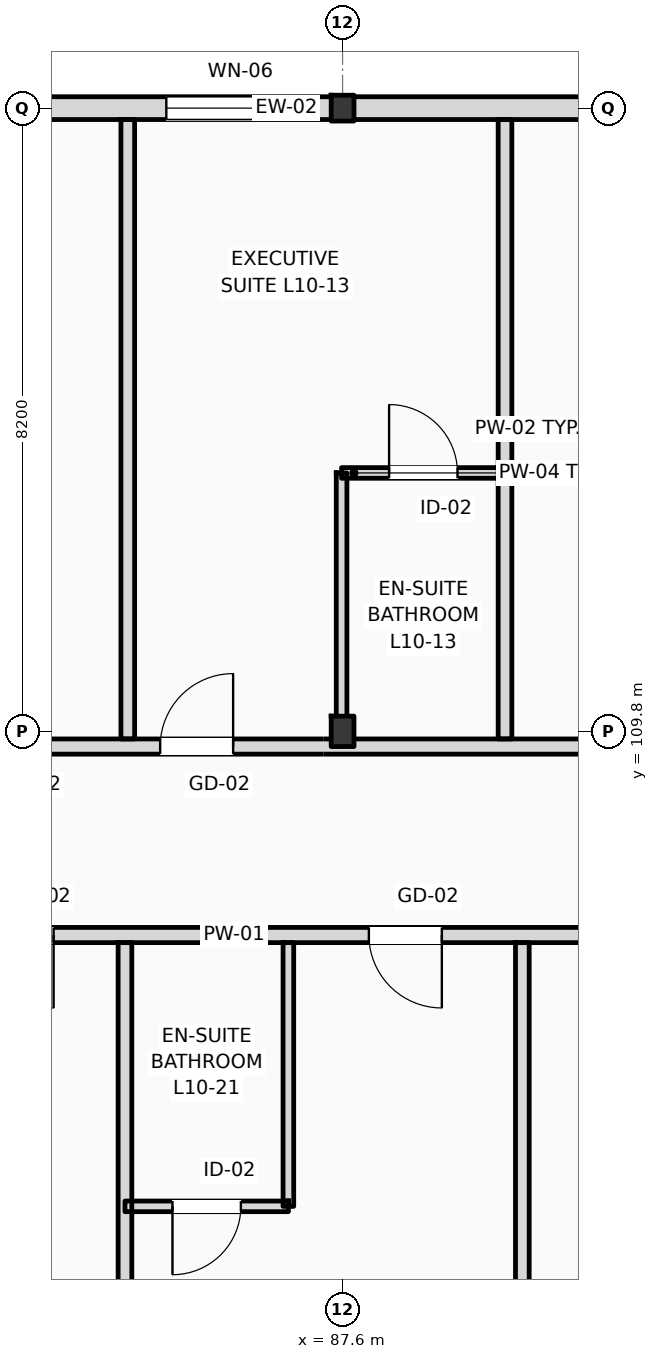
"""IFC4 building model, lengths in metres.
Left out: names, types, materials, properties, quantities, classifications, styles, units other than length and angle.
Written with IfcOpenShell. Run it as: python <this file> out.ifc"""

import sys

from ifc_helpers import new_model, si_unit, direction, frame, frame_2d, origin, origin_2d, place, context, subcontext, project, spatial, rectangle, i_section, extrude, element, fill, save


model = new_model("IFC4")
c1 = context("Model", 3, precision=1e-05, world=origin(), true_north=direction((0.0, 1.0)))
c2 = subcontext(c1, "Body", "Model", "MODEL_VIEW")
j1 = project(units=[si_unit("LENGTHUNIT", "METRE"), si_unit("PLANEANGLEUNIT", "RADIAN")], contexts=[c1])
p1 = place(None, origin())
s1 = spatial("IfcSite", under=j1, at=p1, CompositionType="ELEMENT")
p2 = place(p1, origin())
s2 = spatial("IfcBuilding", under=s1, at=p2, CompositionType="ELEMENT")
p3 = place(p2, frame((0.0, 0.0, 42.6)))
s3 = spatial("IfcBuildingStorey", under=s2, at=p3, CompositionType="ELEMENT", Elevation=42.6)
p4 = place(p3, frame((87.6, 109.8, 0.0), z_axis=(0.0, 0.0, 1.0), x_axis=(1.0, 0.0, 0.0)))
e1 = element("IfcColumn", 1, at=p4, inside=s3, PredefinedType="COLUMN", context=c2, shape_type="SweptSolid", body=[
    extrude(i_section(OverallWidth=0.3, OverallDepth=0.4, WebThickness=0.013, FlangeThickness=0.024, FilletRadius=0.027, at=origin_2d()), origin(), (0.0, 0.0, 1.0), 4.2),
])
p5 = place(p3, frame((87.6, 118.0, 0.0), z_axis=(0.0, 0.0, 1.0), x_axis=(1.0, 0.0, 0.0)))
e2 = element("IfcColumn", 2, at=p5, inside=s3, PredefinedType="COLUMN", context=c2, shape_type="SweptSolid", body=[
    extrude(i_section(OverallWidth=0.3, OverallDepth=0.34, WebThickness=0.012, FlangeThickness=0.021, FilletRadius=0.027, at=origin_2d()), origin(), (0.0, 0.0, 1.0), 4.2),
])
p6 = place(p3, frame((22.5, 118.0, 0.0), z_axis=(0.0, 0.0, 1.0), x_axis=(1.0, 0.0, 0.0)))
e3 = element("IfcWall", 3, at=p6, inside=s3, PredefinedType="STANDARD", context=c2, shape_type="SweptSolid", body=[
    extrude(rectangle(XDim=72.9, YDim=0.3, at=frame_2d((36.45, 0.0))), origin(), (0.0, 0.0, 1.0), 3.42),
])
p7 = place(p6, frame((3.611, 0.0, 0.9)))
e4 = element("IfcOpeningElement", 4, at=p7, cuts=e3, PredefinedType="OPENING", context=c2, shape_type="SweptSolid", body=[
    extrude(rectangle(XDim=1.35, YDim=1.75, at=frame_2d((0.675, 0.875))), frame((0.0, 0.16, 0.0), z_axis=(0.0, -1.0, 0.0), x_axis=(1.0, 0.0, 0.0)), (0.0, 0.0, 1.0), 0.32),
])
p8 = place(p6, frame((7.091, 0.0, 0.0)))
e5 = element("IfcOpeningElement", 5, at=p8, cuts=e3, PredefinedType="OPENING", context=c2, shape_type="SweptSolid", body=[
    extrude(rectangle(XDim=1.2, YDim=2.25, at=frame_2d((0.6, 1.125))), frame((0.0, 0.16, 0.0), z_axis=(0.0, -1.0, 0.0), x_axis=(1.0, 0.0, 0.0)), (0.0, 0.0, 1.0), 0.32),
])
p9 = place(p6, frame((12.328, 0.0, 0.9)))
e6 = element("IfcOpeningElement", 6, at=p9, cuts=e3, PredefinedType="OPENING", context=c2, shape_type="SweptSolid", body=[
    extrude(rectangle(XDim=2.0, YDim=2.34, at=frame_2d((1.0, 1.17))), frame((0.0, 0.16, 0.0), z_axis=(0.0, -1.0, 0.0), x_axis=(1.0, 0.0, 0.0)), (0.0, 0.0, 1.0), 0.32),
])
p10 = place(p6, frame((19.12, 0.0, 0.9)))
e7 = element("IfcOpeningElement", 7, at=p10, cuts=e3, PredefinedType="OPENING", context=c2, shape_type="SweptSolid", body=[
    extrude(rectangle(XDim=1.35, YDim=2.34, at=frame_2d((0.675, 1.17))), frame((0.0, 0.16, 0.0), z_axis=(0.0, -1.0, 0.0), x_axis=(1.0, 0.0, 0.0)), (0.0, 0.0, 1.0), 0.32),
])
p11 = place(p6, frame((22.696, 0.0, 0.0)))
e8 = element("IfcOpeningElement", 8, at=p11, cuts=e3, PredefinedType="OPENING", context=c2, shape_type="SweptSolid", body=[
    extrude(rectangle(XDim=1.2, YDim=2.25, at=frame_2d((0.6, 1.125))), frame((0.0, 0.16, 0.0), z_axis=(0.0, -1.0, 0.0), x_axis=(1.0, 0.0, 0.0)), (0.0, 0.0, 1.0), 0.32),
])
p12 = place(p6, frame((27.205, 0.0, 0.9)))
e9 = element("IfcOpeningElement", 9, at=p12, cuts=e3, PredefinedType="OPENING", context=c2, shape_type="SweptSolid", body=[
    extrude(rectangle(XDim=3.1, YDim=2.34, at=frame_2d((1.55, 1.17))), frame((0.0, 0.16, 0.0), z_axis=(0.0, -1.0, 0.0), x_axis=(1.0, 0.0, 0.0)), (0.0, 0.0, 1.0), 0.32),
])
p13 = place(p6, frame((31.948, 0.0, 0.9)))
e10 = element("IfcOpeningElement", 10, at=p13, cuts=e3, PredefinedType="OPENING", context=c2, shape_type="SweptSolid", body=[
    extrude(rectangle(XDim=1.1, YDim=2.34, at=frame_2d((0.55, 1.17))), frame((0.0, 0.16, 0.0), z_axis=(0.0, -1.0, 0.0), x_axis=(1.0, 0.0, 0.0)), (0.0, 0.0, 1.0), 0.32),
])
p14 = place(p6, frame((38.12, 0.0, 0.0)))
e11 = element("IfcOpeningElement", 11, at=p14, cuts=e3, PredefinedType="OPENING", context=c2, shape_type="SweptSolid", body=[
    extrude(rectangle(XDim=1.2, YDim=2.25, at=frame_2d((0.6, 1.125))), frame((0.0, 0.16, 0.0), z_axis=(0.0, -1.0, 0.0), x_axis=(1.0, 0.0, 0.0)), (0.0, 0.0, 1.0), 0.32),
])
p15 = place(p6, frame((43.51, 0.0, 0.9)))
e12 = element("IfcOpeningElement", 12, at=p15, cuts=e3, PredefinedType="OPENING", context=c2, shape_type="SweptSolid", body=[
    extrude(rectangle(XDim=1.35, YDim=1.85, at=frame_2d((0.675, 0.925))), frame((0.0, 0.16, 0.0), z_axis=(0.0, -1.0, 0.0), x_axis=(1.0, 0.0, 0.0)), (0.0, 0.0, 1.0), 0.32),
])
p16 = place(p6, frame((47.178, 0.0, 0.9)))
e13 = element("IfcOpeningElement", 13, at=p16, cuts=e3, PredefinedType="OPENING", context=c2, shape_type="SweptSolid", body=[
    extrude(rectangle(XDim=1.5, YDim=1.9, at=frame_2d((0.75, 0.95))), frame((0.0, 0.16, 0.0), z_axis=(0.0, -1.0, 0.0), x_axis=(1.0, 0.0, 0.0)), (0.0, 0.0, 1.0), 0.32),
])
p17 = place(p6, frame((53.724, 0.0, 0.0)))
e14 = element("IfcOpeningElement", 14, at=p17, cuts=e3, PredefinedType="OPENING", context=c2, shape_type="SweptSolid", body=[
    extrude(rectangle(XDim=1.2, YDim=2.25, at=frame_2d((0.6, 1.125))), frame((0.0, 0.16, 0.0), z_axis=(0.0, -1.0, 0.0), x_axis=(1.0, 0.0, 0.0)), (0.0, 0.0, 1.0), 0.32),
])
p18 = place(p6, frame((58.712, 0.0, 0.9)))
e15 = element("IfcOpeningElement", 15, at=p18, cuts=e3, PredefinedType="OPENING", context=c2, shape_type="SweptSolid", body=[
    extrude(rectangle(XDim=1.8, YDim=2.0, at=frame_2d((0.9, 1.0))), frame((0.0, 0.16, 0.0), z_axis=(0.0, -1.0, 0.0), x_axis=(1.0, 0.0, 0.0)), (0.0, 0.0, 1.0), 0.32),
])
p19 = place(p6, frame((62.781, 0.0, 0.9)))
e16 = element("IfcOpeningElement", 16, at=p19, cuts=e3, PredefinedType="OPENING", context=c2, shape_type="SweptSolid", body=[
    extrude(rectangle(XDim=1.35, YDim=2.05, at=frame_2d((0.675, 1.025))), frame((0.0, 0.16, 0.0), z_axis=(0.0, -1.0, 0.0), x_axis=(1.0, 0.0, 0.0)), (0.0, 0.0, 1.0), 0.32),
])
p20 = place(p6, frame((68.819, 0.0, 0.9)))
e17 = element("IfcOpeningElement", 17, at=p20, cuts=e3, PredefinedType="OPENING", context=c2, shape_type="SweptSolid", body=[
    extrude(rectangle(XDim=2.1, YDim=2.1, at=frame_2d((1.05, 1.05))), frame((0.0, 0.16, 0.0), z_axis=(0.0, -1.0, 0.0), x_axis=(1.0, 0.0, 0.0)), (0.0, 0.0, 1.0), 0.32),
])
p21 = place(p3, frame((10.65, 109.6, 0.0), z_axis=(0.0, 0.0, 1.0), x_axis=(1.0, 0.0, 0.0)))
e18 = element("IfcWall", 18, at=p21, inside=s3, PredefinedType="PARTITIONING", context=c2, shape_type="SweptSolid", body=[
    extrude(rectangle(XDim=84.61, YDim=0.2, at=frame_2d((42.305, 0.0))), origin(), (0.0, 0.0, 1.0), 3.38),
])
p22 = place(p21, frame((15.926, 0.0, 0.0)))
e19 = element("IfcOpeningElement", 19, at=p22, cuts=e18, PredefinedType="OPENING", context=c2, shape_type="SweptSolid", body=[
    extrude(rectangle(XDim=1.02, YDim=2.2, at=frame_2d((0.51, 1.1))), frame((0.0, 0.11, 0.0), z_axis=(0.0, -1.0, 0.0), x_axis=(1.0, 0.0, 0.0)), (0.0, 0.0, 1.0), 0.22),
])
p23 = place(p21, frame((18.45, 0.0, 0.0)))
e20 = element("IfcOpeningElement", 20, at=p23, cuts=e18, PredefinedType="OPENING", context=c2, shape_type="SweptSolid", body=[
    extrude(rectangle(XDim=1.02, YDim=2.2, at=frame_2d((0.51, 1.1))), frame((0.0, 0.11, 0.0), z_axis=(0.0, -1.0, 0.0), x_axis=(1.0, 0.0, 0.0)), (0.0, 0.0, 1.0), 0.22),
])
p24 = place(p21, frame((25.742, 0.0, 0.0)))
e21 = element("IfcOpeningElement", 21, at=p24, cuts=e18, PredefinedType="OPENING", context=c2, shape_type="SweptSolid", body=[
    extrude(rectangle(XDim=1.02, YDim=2.2, at=frame_2d((0.51, 1.1))), frame((0.0, 0.11, 0.0), z_axis=(0.0, -1.0, 0.0), x_axis=(1.0, 0.0, 0.0)), (0.0, 0.0, 1.0), 0.22),
])
p25 = place(p21, frame((31.385, 0.0, 0.0)))
e22 = element("IfcOpeningElement", 22, at=p25, cuts=e18, PredefinedType="OPENING", context=c2, shape_type="SweptSolid", body=[
    extrude(rectangle(XDim=1.02, YDim=2.2, at=frame_2d((0.51, 1.1))), frame((0.0, 0.11, 0.0), z_axis=(0.0, -1.0, 0.0), x_axis=(1.0, 0.0, 0.0)), (0.0, 0.0, 1.0), 0.22),
])
p26 = place(p21, frame((33.908, 0.0, 0.0)))
e23 = element("IfcOpeningElement", 23, at=p26, cuts=e18, PredefinedType="OPENING", context=c2, shape_type="SweptSolid", body=[
    extrude(rectangle(XDim=0.96, YDim=2.2, at=frame_2d((0.48, 1.1))), frame((0.0, 0.11, 0.0), z_axis=(0.0, -1.0, 0.0), x_axis=(1.0, 0.0, 0.0)), (0.0, 0.0, 1.0), 0.22),
])
p27 = place(p21, frame((41.201, 0.0, 0.0)))
e24 = element("IfcOpeningElement", 24, at=p27, cuts=e18, PredefinedType="OPENING", context=c2, shape_type="SweptSolid", body=[
    extrude(rectangle(XDim=0.96, YDim=2.2, at=frame_2d((0.48, 1.1))), frame((0.0, 0.11, 0.0), z_axis=(0.0, -1.0, 0.0), x_axis=(1.0, 0.0, 0.0)), (0.0, 0.0, 1.0), 0.22),
])
p28 = place(p21, frame((46.844, 0.0, 0.0)))
e25 = element("IfcOpeningElement", 25, at=p28, cuts=e18, PredefinedType="OPENING", context=c2, shape_type="SweptSolid", body=[
    extrude(rectangle(XDim=0.96, YDim=2.2, at=frame_2d((0.48, 1.1))), frame((0.0, 0.11, 0.0), z_axis=(0.0, -1.0, 0.0), x_axis=(1.0, 0.0, 0.0)), (0.0, 0.0, 1.0), 0.22),
])
p29 = place(p21, frame((49.337, 0.0, 0.0)))
e26 = element("IfcOpeningElement", 26, at=p29, cuts=e18, PredefinedType="OPENING", context=c2, shape_type="SweptSolid", body=[
    extrude(rectangle(XDim=0.96, YDim=2.2, at=frame_2d((0.48, 1.1))), frame((0.0, 0.11, 0.0), z_axis=(0.0, -1.0, 0.0), x_axis=(1.0, 0.0, 0.0)), (0.0, 0.0, 1.0), 0.22),
])
p30 = place(p21, frame((56.63, 0.0, 0.0)))
e27 = element("IfcOpeningElement", 27, at=p30, cuts=e18, PredefinedType="OPENING", context=c2, shape_type="SweptSolid", body=[
    extrude(rectangle(XDim=0.96, YDim=2.2, at=frame_2d((0.48, 1.1))), frame((0.0, 0.11, 0.0), z_axis=(0.0, -1.0, 0.0), x_axis=(1.0, 0.0, 0.0)), (0.0, 0.0, 1.0), 0.22),
])
p31 = place(p21, frame((62.523, 0.0, 0.0)))
e28 = element("IfcOpeningElement", 28, at=p31, cuts=e18, PredefinedType="OPENING", context=c2, shape_type="SweptSolid", body=[
    extrude(rectangle(XDim=0.96, YDim=2.2, at=frame_2d((0.48, 1.1))), frame((0.0, 0.11, 0.0), z_axis=(0.0, -1.0, 0.0), x_axis=(1.0, 0.0, 0.0)), (0.0, 0.0, 1.0), 0.22),
])
p32 = place(p21, frame((64.765, 0.0, 0.0)))
e29 = element("IfcOpeningElement", 29, at=p32, cuts=e18, PredefinedType="OPENING", context=c2, shape_type="SweptSolid", body=[
    extrude(rectangle(XDim=0.96, YDim=2.2, at=frame_2d((0.48, 1.1))), frame((0.0, 0.11, 0.0), z_axis=(0.0, -1.0, 0.0), x_axis=(1.0, 0.0, 0.0)), (0.0, 0.0, 1.0), 0.22),
])
p33 = place(p21, frame((72.057, 0.0, 0.0)))
e30 = element("IfcOpeningElement", 30, at=p33, cuts=e18, PredefinedType="OPENING", context=c2, shape_type="SweptSolid", body=[
    extrude(rectangle(XDim=0.96, YDim=2.2, at=frame_2d((0.48, 1.1))), frame((0.0, 0.11, 0.0), z_axis=(0.0, -1.0, 0.0), x_axis=(1.0, 0.0, 0.0)), (0.0, 0.0, 1.0), 0.22),
])
p34 = place(p21, frame((74.55, 0.0, 0.0)))
e31 = element("IfcOpeningElement", 31, at=p34, cuts=e18, PredefinedType="OPENING", context=c2, shape_type="SweptSolid", body=[
    extrude(rectangle(XDim=0.96, YDim=2.2, at=frame_2d((0.48, 1.1))), frame((0.0, 0.11, 0.0), z_axis=(0.0, -1.0, 0.0), x_axis=(1.0, 0.0, 0.0)), (0.0, 0.0, 1.0), 0.22),
])
p35 = place(p21, frame((80.163, 0.0, 0.0)))
e32 = element("IfcOpeningElement", 32, at=p35, cuts=e18, PredefinedType="OPENING", context=c2, shape_type="SweptSolid", body=[
    extrude(rectangle(XDim=0.96, YDim=2.2, at=frame_2d((0.48, 1.1))), frame((0.0, 0.11, 0.0), z_axis=(0.0, -1.0, 0.0), x_axis=(1.0, 0.0, 0.0)), (0.0, 0.0, 1.0), 0.22),
])
p36 = place(p21, frame((2.716, 0.0, 0.0)))
e33 = element("IfcOpeningElement", 33, at=p36, cuts=e18, PredefinedType="OPENING", context=c2, shape_type="SweptSolid", body=[
    extrude(rectangle(XDim=1.35, YDim=2.25, at=frame_2d((0.675, 1.125))), frame((0.0, 0.11, 0.0), z_axis=(0.0, -1.0, 0.0), x_axis=(1.0, 0.0, 0.0)), (0.0, 0.0, 1.0), 0.22),
])
p37 = place(p21, frame((6.65, 0.0, 0.0)))
e34 = element("IfcOpeningElement", 34, at=p37, cuts=e18, PredefinedType="OPENING", context=c2, shape_type="SweptSolid", body=[
    extrude(rectangle(XDim=1.35, YDim=2.25, at=frame_2d((0.675, 1.125))), frame((0.0, 0.11, 0.0), z_axis=(0.0, -1.0, 0.0), x_axis=(1.0, 0.0, 0.0)), (0.0, 0.0, 1.0), 0.22),
])
p38 = place(p21, frame((10.583, 0.0, 0.0)))
e35 = element("IfcOpeningElement", 35, at=p38, cuts=e18, PredefinedType="OPENING", context=c2, shape_type="SweptSolid", body=[
    extrude(rectangle(XDim=1.35, YDim=2.25, at=frame_2d((0.675, 1.125))), frame((0.0, 0.11, 0.0), z_axis=(0.0, -1.0, 0.0), x_axis=(1.0, 0.0, 0.0)), (0.0, 0.0, 1.0), 0.22),
])
p39 = place(p3, frame((79.76, 107.12, 0.0), z_axis=(0.0, 0.0, 1.0), x_axis=(1.0, 0.0, 0.0)))
e36 = element("IfcWall", 36, at=p39, inside=s3, PredefinedType="PARTITIONING", context=c2, shape_type="SweptSolid", body=[
    extrude(rectangle(XDim=15.5, YDim=0.2, at=frame_2d((7.75, 0.0))), origin(), (0.0, 0.0, 1.0), 3.94),
])
p40 = place(p39, frame((3.078, 0.0, 0.0)))
e37 = element("IfcOpeningElement", 37, at=p40, cuts=e36, PredefinedType="OPENING", context=c2, shape_type="SweptSolid", body=[
    extrude(rectangle(XDim=0.96, YDim=2.2, at=frame_2d((0.48, 1.1))), frame((0.0, 0.11, 0.0), z_axis=(0.0, -1.0, 0.0), x_axis=(1.0, 0.0, 0.0)), (0.0, 0.0, 1.0), 0.22),
])
p41 = place(p39, frame((8.186, 0.0, 0.0)))
e38 = element("IfcOpeningElement", 38, at=p41, cuts=e36, PredefinedType="OPENING", context=c2, shape_type="SweptSolid", body=[
    extrude(rectangle(XDim=0.96, YDim=2.2, at=frame_2d((0.48, 1.1))), frame((0.0, 0.11, 0.0), z_axis=(0.0, -1.0, 0.0), x_axis=(1.0, 0.0, 0.0)), (0.0, 0.0, 1.0), 0.22),
])
p42 = place(p39, frame((11.167, 0.0, 0.0)))
e39 = element("IfcOpeningElement", 39, at=p42, cuts=e36, PredefinedType="OPENING", context=c2, shape_type="SweptSolid", body=[
    extrude(rectangle(XDim=0.96, YDim=2.2, at=frame_2d((0.48, 1.1))), frame((0.0, 0.11, 0.0), z_axis=(0.0, -1.0, 0.0), x_axis=(1.0, 0.0, 0.0)), (0.0, 0.0, 1.0), 0.22),
])
p43 = place(p3, frame((84.774, 109.7, 0.0), z_axis=(0.0, 0.0, 1.0), x_axis=(0.0, 1.0, 0.0)))
e40 = element("IfcWall", 40, at=p43, inside=s3, PredefinedType="PARTITIONING", context=c2, shape_type="SweptSolid", body=[
    extrude(rectangle(XDim=8.15, YDim=0.18, at=frame_2d((4.075, 0.0))), origin(), (0.0, 0.0, 1.0), 3.57),
])
p44 = place(p3, frame((89.737, 109.7, 0.0), z_axis=(0.0, 0.0, 1.0), x_axis=(0.0, 1.0, 0.0)))
e41 = element("IfcWall", 41, at=p44, inside=s3, PredefinedType="PARTITIONING", context=c2, shape_type="SweptSolid", body=[
    extrude(rectangle(XDim=8.15, YDim=0.18, at=frame_2d((4.075, 0.0))), origin(), (0.0, 0.0, 1.0), 3.94),
])
p45 = place(p3, frame((87.587, 109.7, 0.0), z_axis=(0.0, 0.0, 1.0), x_axis=(0.0, 1.0, 0.0)))
e42 = element("IfcWall", 42, at=p45, inside=s3, PredefinedType="PARTITIONING", context=c2, shape_type="SweptSolid", body=[
    extrude(rectangle(XDim=3.5, YDim=0.14, at=frame_2d((1.75, 0.0))), origin(), (0.0, 0.0, 1.0), 3.51),
])
p46 = place(p3, frame((87.587, 113.2, 0.0), z_axis=(0.0, 0.0, 1.0), x_axis=(1.0, 0.0, 0.0)))
e43 = element("IfcWall", 43, at=p46, inside=s3, PredefinedType="PARTITIONING", context=c2, shape_type="SweptSolid", body=[
    extrude(rectangle(XDim=2.15, YDim=0.14, at=frame_2d((1.075, 0.0))), origin(), (0.0, 0.0, 1.0), 3.94),
])
p47 = place(p46, frame((0.625, 0.0, 0.0)))
e44 = element("IfcOpeningElement", 44, at=p47, cuts=e43, PredefinedType="OPENING", context=c2, shape_type="SweptSolid", body=[
    extrude(rectangle(XDim=0.9, YDim=2.1, at=frame_2d((0.45, 1.05))), frame((0.0, 0.08, 0.0), z_axis=(0.0, -1.0, 0.0), x_axis=(1.0, 0.0, 0.0)), (0.0, 0.0, 1.0), 0.16),
])
p48 = place(p3, frame((84.737, 96.14, 0.0), z_axis=(0.0, 0.0, 1.0), x_axis=(0.0, 1.0, 0.0)))
e45 = element("IfcWall", 45, at=p48, inside=s3, PredefinedType="PARTITIONING", context=c2, shape_type="SweptSolid", body=[
    extrude(rectangle(XDim=10.88, YDim=0.18, at=frame_2d((5.44, 0.0))), origin(), (0.0, 0.0, 1.0), 3.94),
])
p49 = place(p3, frame((89.965, 96.14, 0.0), z_axis=(0.0, 0.0, 1.0), x_axis=(0.0, 1.0, 0.0)))
e46 = element("IfcWall", 46, at=p49, inside=s3, PredefinedType="PARTITIONING", context=c2, shape_type="SweptSolid", body=[
    extrude(rectangle(XDim=10.88, YDim=0.18, at=frame_2d((5.44, 0.0))), origin(), (0.0, 0.0, 1.0), 3.57),
])
p50 = place(p3, frame((86.887, 103.55, 0.0), z_axis=(0.0, 0.0, 1.0), x_axis=(0.0, 1.0, 0.0)))
e47 = element("IfcWall", 47, at=p50, inside=s3, PredefinedType="PARTITIONING", context=c2, shape_type="SweptSolid", body=[
    extrude(rectangle(XDim=3.47, YDim=0.14, at=frame_2d((1.735, 0.0))), origin(), (0.0, 0.0, 1.0), 3.94),
])
p51 = place(p3, frame((84.737, 103.55, 0.0), z_axis=(0.0, 0.0, 1.0), x_axis=(1.0, 0.0, 0.0)))
e48 = element("IfcWall", 48, at=p51, inside=s3, PredefinedType="PARTITIONING", context=c2, shape_type="SweptSolid", body=[
    extrude(rectangle(XDim=2.15, YDim=0.14, at=frame_2d((1.075, 0.0))), origin(), (0.0, 0.0, 1.0), 3.94),
])
p52 = place(p51, frame((0.625, 0.0, 0.0)))
e49 = element("IfcOpeningElement", 49, at=p52, cuts=e48, PredefinedType="OPENING", context=c2, shape_type="SweptSolid", body=[
    extrude(rectangle(XDim=0.9, YDim=2.1, at=frame_2d((0.45, 1.05))), frame((0.0, 0.08, 0.0), z_axis=(0.0, -1.0, 0.0), x_axis=(1.0, 0.0, 0.0)), (0.0, 0.0, 1.0), 0.16),
])
p53 = place(p19, origin())
e50 = element("IfcWindow", 50, at=p53, inside=s3, PartitioningType="DOUBLE_PANEL_VERTICAL", PredefinedType="WINDOW", context=c2, shape_type="SweptSolid", body=[
    extrude(rectangle(XDim=1.35, YDim=2.05, at=frame_2d((0.675, 1.025))), frame((0.0, 0.03, 0.0), z_axis=(0.0, -1.0, 0.0), x_axis=(1.0, 0.0, 0.0)), (0.0, 0.0, 1.0), 0.06),
])
fill(e16, e50)
p54 = place(p34, origin())
e51 = element("IfcDoor", 51, at=p54, inside=s3, OperationType="SINGLE_SWING_RIGHT", PredefinedType="DOOR", context=c2, shape_type="SweptSolid", body=[
    extrude(rectangle(XDim=0.96, YDim=2.2, at=frame_2d((0.48, 1.1))), frame((0.0, 0.025, 0.0), z_axis=(0.0, -1.0, 0.0), x_axis=(1.0, 0.0, 0.0)), (0.0, 0.0, 1.0), 0.05),
])
fill(e31, e51)
p55 = place(p47, origin())
e52 = element("IfcDoor", 52, at=p55, inside=s3, OperationType="SINGLE_SWING_LEFT", PredefinedType="DOOR", context=c2, shape_type="SweptSolid", body=[
    extrude(rectangle(XDim=0.9, YDim=2.1, at=frame_2d((0.45, 1.05))), frame((0.0, 0.025, 0.0), z_axis=(0.0, -1.0, 0.0), x_axis=(1.0, 0.0, 0.0)), (0.0, 0.0, 1.0), 0.05),
])
fill(e44, e52)
p56 = place(p40, frame((0.96, 0.0, 0.0), z_axis=(0.0, 0.0, 1.0), x_axis=(-1.0, 0.0, 0.0)))
e53 = element("IfcDoor", 53, at=p56, inside=s3, OperationType="SINGLE_SWING_RIGHT", PredefinedType="DOOR", context=c2, shape_type="SweptSolid", body=[
    extrude(rectangle(XDim=0.96, YDim=2.2, at=frame_2d((0.48, 1.1))), frame((0.0, 0.025, 0.0), z_axis=(0.0, -1.0, 0.0), x_axis=(1.0, 0.0, 0.0)), (0.0, 0.0, 1.0), 0.05),
])
fill(e37, e53)
p57 = place(p41, frame((0.96, 0.0, 0.0), z_axis=(0.0, 0.0, 1.0), x_axis=(-1.0, 0.0, 0.0)))
e54 = element("IfcDoor", 54, at=p57, inside=s3, OperationType="SINGLE_SWING_RIGHT", PredefinedType="DOOR", context=c2, shape_type="SweptSolid", body=[
    extrude(rectangle(XDim=0.96, YDim=2.2, at=frame_2d((0.48, 1.1))), frame((0.0, 0.025, 0.0), z_axis=(0.0, -1.0, 0.0), x_axis=(1.0, 0.0, 0.0)), (0.0, 0.0, 1.0), 0.05),
])
fill(e38, e54)
p58 = place(p52, frame((0.9, 0.0, 0.0), z_axis=(0.0, 0.0, 1.0), x_axis=(-1.0, 0.0, 0.0)))
e55 = element("IfcDoor", 55, at=p58, inside=s3, OperationType="SINGLE_SWING_LEFT", PredefinedType="DOOR", context=c2, shape_type="SweptSolid", body=[
    extrude(rectangle(XDim=0.9, YDim=2.1, at=frame_2d((0.45, 1.05))), frame((0.0, 0.025, 0.0), z_axis=(0.0, -1.0, 0.0), x_axis=(1.0, 0.0, 0.0)), (0.0, 0.0, 1.0), 0.05),
])
fill(e49, e55)
save(model, sys.argv[1])
